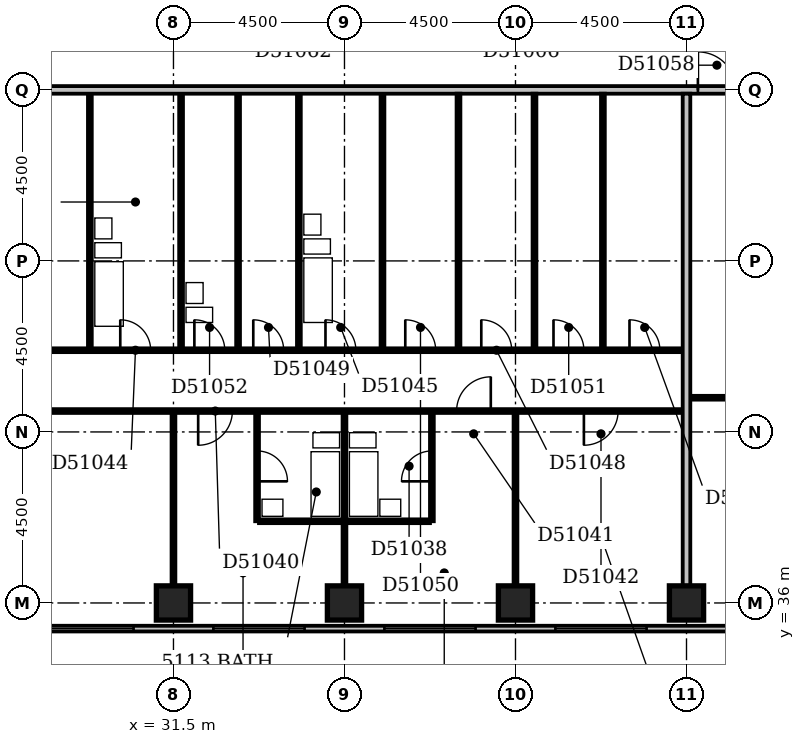
"""IFC4 building model, lengths in metres.
Left out: names, types, materials, properties, quantities, classifications, styles, units other than length and angle.
Written with IfcOpenShell. Run it as: python <this file> out.ifc"""

import sys

from ifc_helpers import new_model, si_unit, direction, frame, frame_2d, origin, origin_2d, place, context, subcontext, project, spatial, rectangle, extrude, element, fill, save


model = new_model("IFC4")
c1 = context("Model", 3, precision=1e-05, world=origin(), true_north=direction((0.0, 1.0)))
c2 = subcontext(c1, "Body", "Model", "MODEL_VIEW")
j1 = project(units=[si_unit("LENGTHUNIT", "METRE"), si_unit("PLANEANGLEUNIT", "RADIAN")], contexts=[c1])
p1 = place(None, origin())
s1 = spatial("IfcSite", under=j1, at=p1, CompositionType="ELEMENT")
p2 = place(p1, origin())
s2 = spatial("IfcBuilding", under=s1, at=p2, CompositionType="ELEMENT")
p3 = place(p2, frame((0.0, 0.0, 200.6)))
s3 = spatial("IfcBuildingStorey", under=s2, at=p3, CompositionType="ELEMENT", Elevation=200.6)
for number, where, z_axis, x_axis in (
    (1, (31.5, 36.0, -0.3), (0.0, 0.0, 1.0), (1.0, 0.0, 0.0)),
    (2, (36.0, 36.0, -0.3), (0.0, 0.0, 1.0), (1.0, 0.0, 0.0)),
    (3, (40.5, 36.0, -0.3), (0.0, 0.0, 1.0), (1.0, 0.0, 0.0)),
    (4, (45.0, 36.0, -0.3), (0.0, 0.0, 1.0), (1.0, 0.0, 0.0)),
):
    element("IfcColumn", number, at=place(p3, frame(where, z_axis=z_axis, x_axis=x_axis)), inside=s3, PredefinedType="COLUMN", context=c2, shape_type="SweptSolid", body=[
        extrude(rectangle(XDim=0.9, YDim=0.9, at=origin_2d()), origin(), (0.0, 0.0, 1.0), 3.6),
    ])
p4 = place(p3, frame((23.1, 35.325, 0.0), z_axis=(0.0, 0.0, 1.0), x_axis=(1.0, 0.0, 0.0)))
e5 = element("IfcWall", 5, at=p4, inside=s3, PredefinedType="STANDARD", context=c2, shape_type="SweptSolid", body=[
    extrude(rectangle(XDim=27.15, YDim=0.15, at=frame_2d((13.575, 0.0))), origin(), (0.0, 0.0, 1.0), 2.7),
])
p5 = place(p4, frame((0.45, 0.0, 0.6)))
e6 = element("IfcOpeningElement", 6, at=p5, cuts=e5, PredefinedType="OPENING", context=c2, shape_type="SweptSolid", body=[
    extrude(rectangle(XDim=2.4, YDim=1.8, at=frame_2d((1.2, 0.9))), frame((0.0, 0.087, 0.0), z_axis=(0.0, -1.0, 0.0), x_axis=(1.0, 0.0, 0.0)), (0.0, 0.0, 1.0), 0.174),
])
p6 = place(p4, frame((4.95, 0.0, 0.6)))
e7 = element("IfcOpeningElement", 7, at=p6, cuts=e5, PredefinedType="OPENING", context=c2, shape_type="SweptSolid", body=[
    extrude(rectangle(XDim=2.4, YDim=1.8, at=frame_2d((1.2, 0.9))), frame((0.0, 0.087, 0.0), z_axis=(0.0, -1.0, 0.0), x_axis=(1.0, 0.0, 0.0)), (0.0, 0.0, 1.0), 0.174),
])
p7 = place(p4, frame((9.45, 0.0, 0.6)))
e8 = element("IfcOpeningElement", 8, at=p7, cuts=e5, PredefinedType="OPENING", context=c2, shape_type="SweptSolid", body=[
    extrude(rectangle(XDim=2.4, YDim=1.8, at=frame_2d((1.2, 0.9))), frame((0.0, 0.087, 0.0), z_axis=(0.0, -1.0, 0.0), x_axis=(1.0, 0.0, 0.0)), (0.0, 0.0, 1.0), 0.174),
])
p8 = place(p4, frame((13.95, 0.0, 0.6)))
e9 = element("IfcOpeningElement", 9, at=p8, cuts=e5, PredefinedType="OPENING", context=c2, shape_type="SweptSolid", body=[
    extrude(rectangle(XDim=2.4, YDim=1.8, at=frame_2d((1.2, 0.9))), frame((0.0, 0.087, 0.0), z_axis=(0.0, -1.0, 0.0), x_axis=(1.0, 0.0, 0.0)), (0.0, 0.0, 1.0), 0.174),
])
p9 = place(p4, frame((18.45, 0.0, 0.6)))
e10 = element("IfcOpeningElement", 10, at=p9, cuts=e5, PredefinedType="OPENING", context=c2, shape_type="SweptSolid", body=[
    extrude(rectangle(XDim=2.4, YDim=1.8, at=frame_2d((1.2, 0.9))), frame((0.0, 0.087, 0.0), z_axis=(0.0, -1.0, 0.0), x_axis=(1.0, 0.0, 0.0)), (0.0, 0.0, 1.0), 0.174),
])
p10 = place(p4, frame((22.95, 0.0, 0.6)))
e11 = element("IfcOpeningElement", 11, at=p10, cuts=e5, PredefinedType="OPENING", context=c2, shape_type="SweptSolid", body=[
    extrude(rectangle(XDim=2.4, YDim=1.8, at=frame_2d((1.2, 0.9))), frame((0.0, 0.087, 0.0), z_axis=(0.0, -1.0, 0.0), x_axis=(1.0, 0.0, 0.0)), (0.0, 0.0, 1.0), 0.174),
])
p11 = place(p3, frame((31.5, 36.45, 0.0), z_axis=(0.0, 0.0, 1.0), x_axis=(0.0, 1.0, 0.0)))
e12 = element("IfcWall", 12, at=p11, inside=s3, PredefinedType="PARTITIONING", context=c2, shape_type="SweptSolid", body=[
    extrude(rectangle(XDim=4.55, YDim=0.1, at=frame_2d((2.275, 0.0))), origin(), (0.0, 0.0, 1.0), 3.3),
])
p12 = place(p3, frame((36.0, 36.45, 0.0), z_axis=(0.0, 0.0, 1.0), x_axis=(0.0, 1.0, 0.0)))
e13 = element("IfcWall", 13, at=p12, inside=s3, PredefinedType="PARTITIONING", context=c2, shape_type="SweptSolid", body=[
    extrude(rectangle(XDim=4.55, YDim=0.1, at=frame_2d((2.275, 0.0))), origin(), (0.0, 0.0, 1.0), 2.4),
])
p13 = place(p3, frame((40.5, 36.45, 0.0), z_axis=(0.0, 0.0, 1.0), x_axis=(0.0, 1.0, 0.0)))
e14 = element("IfcWall", 14, at=p13, inside=s3, PredefinedType="PARTITIONING", context=c2, shape_type="SweptSolid", body=[
    extrude(rectangle(XDim=4.55, YDim=0.1, at=frame_2d((2.275, 0.0))), origin(), (0.0, 0.0, 1.0), 3.3),
])
p14 = place(p3, frame((45.0, 36.45, 0.0), z_axis=(0.0, 0.0, 1.0), x_axis=(0.0, 1.0, 0.0)))
e15 = element("IfcWall", 15, at=p14, inside=s3, PredefinedType="PARTITIONING", context=c2, shape_type="SweptSolid", body=[
    extrude(rectangle(XDim=12.95, YDim=0.2, at=frame_2d((6.475, 0.0))), origin(), (0.0, 0.0, 1.0), 2.6),
])
p15 = place(p3, frame((33.7, 38.15, 0.0), z_axis=(0.0, 0.0, 1.0), x_axis=(0.0, 1.0, 0.0)))
e16 = element("IfcWall", 16, at=p15, inside=s3, PredefinedType="PLUMBINGWALL", context=c2, shape_type="SweptSolid", body=[
    extrude(rectangle(XDim=2.85, YDim=0.1, at=frame_2d((1.425, 0.0))), origin(), (0.0, 0.0, 1.0), 3.3),
])
p16 = place(p15, frame((1.05, 0.0, 0.0)))
e17 = element("IfcOpeningElement", 17, at=p16, cuts=e16, PredefinedType="OPENING", context=c2, shape_type="SweptSolid", body=[
    extrude(rectangle(XDim=0.8, YDim=2.1, at=frame_2d((0.4, 1.05))), frame((0.0, 0.062, 0.0), z_axis=(0.0, -1.0, 0.0), x_axis=(1.0, 0.0, 0.0)), (0.0, 0.0, 1.0), 0.124),
])
p17 = place(p3, frame((33.75, 38.15, 0.0), z_axis=(0.0, 0.0, 1.0), x_axis=(1.0, 0.0, 0.0)))
e18 = element("IfcWall", 18, at=p17, inside=s3, PredefinedType="PLUMBINGWALL", context=c2, shape_type="SweptSolid", body=[
    extrude(rectangle(XDim=4.5, YDim=0.1, at=frame_2d((2.25, 0.0))), origin(), (0.0, 0.0, 1.0), 3.3),
])
p18 = place(p3, frame((38.3, 38.15, 0.0), z_axis=(0.0, 0.0, 1.0), x_axis=(0.0, 1.0, 0.0)))
e19 = element("IfcWall", 19, at=p18, inside=s3, PredefinedType="PLUMBINGWALL", context=c2, shape_type="SweptSolid", body=[
    extrude(rectangle(XDim=2.85, YDim=0.1, at=frame_2d((1.425, 0.0))), origin(), (0.0, 0.0, 1.0), 3.3),
])
p19 = place(p18, frame((1.05, 0.0, 0.0)))
e20 = element("IfcOpeningElement", 20, at=p19, cuts=e19, PredefinedType="OPENING", context=c2, shape_type="SweptSolid", body=[
    extrude(rectangle(XDim=0.8, YDim=2.1, at=frame_2d((0.4, 1.05))), frame((0.0, 0.062, 0.0), z_axis=(0.0, -1.0, 0.0), x_axis=(1.0, 0.0, 0.0)), (0.0, 0.0, 1.0), 0.124),
])
p20 = place(p3, frame((22.6, 41.05, 0.0), z_axis=(0.0, 0.0, 1.0), x_axis=(1.0, 0.0, 0.0)))
e21 = element("IfcWall", 21, at=p20, inside=s3, PredefinedType="PARTITIONING", context=c2, shape_type="SweptSolid", body=[
    extrude(rectangle(XDim=22.3, YDim=0.1, at=frame_2d((11.15, 0.0))), origin(), (0.0, 0.0, 1.0), 3.3),
])
p21 = place(p20, frame((3.9, 0.0, 0.0)))
e22 = element("IfcOpeningElement", 22, at=p21, cuts=e21, PredefinedType="OPENING", context=c2, shape_type="SweptSolid", body=[
    extrude(rectangle(XDim=0.9, YDim=2.1, at=frame_2d((0.45, 1.05))), frame((0.0, 0.062, 0.0), z_axis=(0.0, -1.0, 0.0), x_axis=(1.0, 0.0, 0.0)), (0.0, 0.0, 1.0), 0.124),
])
p22 = place(p20, frame((9.55, 0.0, 0.0)))
e23 = element("IfcOpeningElement", 23, at=p22, cuts=e21, PredefinedType="OPENING", context=c2, shape_type="SweptSolid", body=[
    extrude(rectangle(XDim=0.9, YDim=2.1, at=frame_2d((0.45, 1.05))), frame((0.0, 0.062, 0.0), z_axis=(0.0, -1.0, 0.0), x_axis=(1.0, 0.0, 0.0)), (0.0, 0.0, 1.0), 0.124),
])
p23 = place(p20, frame((16.35, 0.0, 0.0)))
e24 = element("IfcOpeningElement", 24, at=p23, cuts=e21, PredefinedType="OPENING", context=c2, shape_type="SweptSolid", body=[
    extrude(rectangle(XDim=0.9, YDim=2.1, at=frame_2d((0.45, 1.05))), frame((0.0, 0.062, 0.0), z_axis=(0.0, -1.0, 0.0), x_axis=(1.0, 0.0, 0.0)), (0.0, 0.0, 1.0), 0.124),
])
p24 = place(p20, frame((19.7, 0.0, 0.0)))
e25 = element("IfcOpeningElement", 25, at=p24, cuts=e21, PredefinedType="OPENING", context=c2, shape_type="SweptSolid", body=[
    extrude(rectangle(XDim=0.9, YDim=2.1, at=frame_2d((0.45, 1.05))), frame((0.0, 0.062, 0.0), z_axis=(0.0, -1.0, 0.0), x_axis=(1.0, 0.0, 0.0)), (0.0, 0.0, 1.0), 0.124),
])
p25 = place(p3, frame((45.1, 41.4, 0.0), z_axis=(0.0, 0.0, 1.0), x_axis=(1.0, 0.0, 0.0)))
e26 = element("IfcWall", 26, at=p25, inside=s3, PredefinedType="PARTITIONING", context=c2, shape_type="SweptSolid", body=[
    extrude(rectangle(XDim=9.5, YDim=0.1, at=frame_2d((4.75, 0.0))), origin(), (0.0, 0.0, 1.0), 3.3),
])
p26 = place(p25, frame((3.95, 0.0, 0.0)))
e27 = element("IfcOpeningElement", 27, at=p26, cuts=e26, PredefinedType="OPENING", context=c2, shape_type="SweptSolid", body=[
    extrude(rectangle(XDim=0.9, YDim=2.1, at=frame_2d((0.45, 1.05))), frame((0.0, 0.062, 0.0), z_axis=(0.0, -1.0, 0.0), x_axis=(1.0, 0.0, 0.0)), (0.0, 0.0, 1.0), 0.124),
])
p27 = place(p3, frame((24.15, 42.65, 0.0), z_axis=(0.0, 0.0, 1.0), x_axis=(1.0, 0.0, 0.0)))
e28 = element("IfcWall", 28, at=p27, inside=s3, PredefinedType="PARTITIONING", context=c2, shape_type="SweptSolid", body=[
    extrude(rectangle(XDim=20.75, YDim=0.1, at=frame_2d((10.375, 0.0))), origin(), (0.0, 0.0, 1.0), 3.3),
])
p28 = place(p27, frame((5.95, 0.0, 0.0)))
e29 = element("IfcOpeningElement", 29, at=p28, cuts=e28, PredefinedType="OPENING", context=c2, shape_type="SweptSolid", body=[
    extrude(rectangle(XDim=0.8, YDim=2.1, at=frame_2d((0.4, 1.05))), frame((0.0, 0.062, 0.0), z_axis=(0.0, -1.0, 0.0), x_axis=(1.0, 0.0, 0.0)), (0.0, 0.0, 1.0), 0.124),
])
p29 = place(p27, frame((11.35, 0.0, 0.0)))
e30 = element("IfcOpeningElement", 30, at=p29, cuts=e28, PredefinedType="OPENING", context=c2, shape_type="SweptSolid", body=[
    extrude(rectangle(XDim=0.8, YDim=2.1, at=frame_2d((0.4, 1.05))), frame((0.0, 0.062, 0.0), z_axis=(0.0, -1.0, 0.0), x_axis=(1.0, 0.0, 0.0)), (0.0, 0.0, 1.0), 0.124),
])
p30 = place(p27, frame((2.1, 0.0, 0.0)))
e31 = element("IfcOpeningElement", 31, at=p30, cuts=e28, PredefinedType="OPENING", context=c2, shape_type="SweptSolid", body=[
    extrude(rectangle(XDim=0.9, YDim=2.1, at=frame_2d((0.45, 1.05))), frame((0.0, 0.062, 0.0), z_axis=(0.0, -1.0, 0.0), x_axis=(1.0, 0.0, 0.0)), (0.0, 0.0, 1.0), 0.124),
])
p31 = place(p27, frame((19.35, 0.0, 0.0)))
e32 = element("IfcOpeningElement", 32, at=p31, cuts=e28, PredefinedType="OPENING", context=c2, shape_type="SweptSolid", body=[
    extrude(rectangle(XDim=0.8, YDim=2.1, at=frame_2d((0.4, 1.05))), frame((0.0, 0.062, 0.0), z_axis=(0.0, -1.0, 0.0), x_axis=(1.0, 0.0, 0.0)), (0.0, 0.0, 1.0), 0.124),
])
p32 = place(p27, frame((15.45, 0.0, 0.0)))
e33 = element("IfcOpeningElement", 33, at=p32, cuts=e28, PredefinedType="OPENING", context=c2, shape_type="SweptSolid", body=[
    extrude(rectangle(XDim=0.8, YDim=2.1, at=frame_2d((0.4, 1.05))), frame((0.0, 0.062, 0.0), z_axis=(0.0, -1.0, 0.0), x_axis=(1.0, 0.0, 0.0)), (0.0, 0.0, 1.0), 0.124),
])
p33 = place(p27, frame((9.45, 0.0, 0.0)))
e34 = element("IfcOpeningElement", 34, at=p33, cuts=e28, PredefinedType="OPENING", context=c2, shape_type="SweptSolid", body=[
    extrude(rectangle(XDim=0.8, YDim=2.1, at=frame_2d((0.4, 1.05))), frame((0.0, 0.062, 0.0), z_axis=(0.0, -1.0, 0.0), x_axis=(1.0, 0.0, 0.0)), (0.0, 0.0, 1.0), 0.124),
])
p34 = place(p27, frame((13.45, 0.0, 0.0)))
e35 = element("IfcOpeningElement", 35, at=p34, cuts=e28, PredefinedType="OPENING", context=c2, shape_type="SweptSolid", body=[
    extrude(rectangle(XDim=0.8, YDim=2.1, at=frame_2d((0.4, 1.05))), frame((0.0, 0.062, 0.0), z_axis=(0.0, -1.0, 0.0), x_axis=(1.0, 0.0, 0.0)), (0.0, 0.0, 1.0), 0.124),
])
p35 = place(p27, frame((17.35, 0.0, 0.0)))
e36 = element("IfcOpeningElement", 36, at=p35, cuts=e28, PredefinedType="OPENING", context=c2, shape_type="SweptSolid", body=[
    extrude(rectangle(XDim=0.8, YDim=2.1, at=frame_2d((0.4, 1.05))), frame((0.0, 0.062, 0.0), z_axis=(0.0, -1.0, 0.0), x_axis=(1.0, 0.0, 0.0)), (0.0, 0.0, 1.0), 0.124),
])
p36 = place(p27, frame((7.9, 0.0, 0.0)))
e37 = element("IfcOpeningElement", 37, at=p36, cuts=e28, PredefinedType="OPENING", context=c2, shape_type="SweptSolid", body=[
    extrude(rectangle(XDim=0.8, YDim=2.1, at=frame_2d((0.4, 1.05))), frame((0.0, 0.062, 0.0), z_axis=(0.0, -1.0, 0.0), x_axis=(1.0, 0.0, 0.0)), (0.0, 0.0, 1.0), 0.124),
])
for number, where, z_axis, x_axis in (
    (38, (29.3, 42.7, 0.0), (0.0, 0.0, 1.0), (0.0, 1.0, 0.0)),
    (39, (31.7, 42.7, 0.0), (0.0, 0.0, 1.0), (0.0, 1.0, 0.0)),
    (40, (33.2, 42.7, 0.0), (0.0, 0.0, 1.0), (0.0, 1.0, 0.0)),
    (41, (34.8, 42.7, 0.0), (0.0, 0.0, 1.0), (0.0, 1.0, 0.0)),
    (42, (37.0, 42.7, 0.0), (0.0, 0.0, 1.0), (0.0, 1.0, 0.0)),
):
    element("IfcWall", number, at=place(p3, frame(where, z_axis=z_axis, x_axis=x_axis)), inside=s3, PredefinedType="PLUMBINGWALL", context=c2, shape_type="SweptSolid", body=[
        extrude(rectangle(XDim=6.7, YDim=0.1, at=frame_2d((3.35, 0.0))), origin(), (0.0, 0.0, 1.0), 3.3),
    ])
for number, where, z_axis, x_axis in (
    (43, (39.0, 42.7, 0.0), (0.0, 0.0, 1.0), (0.0, 1.0, 0.0)),
    (44, (41.0, 42.7, 0.0), (0.0, 0.0, 1.0), (0.0, 1.0, 0.0)),
    (45, (42.8, 42.7, 0.0), (0.0, 0.0, 1.0), (0.0, 1.0, 0.0)),
):
    element("IfcWall", number, at=place(p3, frame(where, z_axis=z_axis, x_axis=x_axis)), inside=s3, PredefinedType="PARTITIONING", context=c2, shape_type="SweptSolid", body=[
        extrude(rectangle(XDim=6.7, YDim=0.1, at=frame_2d((3.35, 0.0))), origin(), (0.0, 0.0, 1.0), 3.3),
    ])
p37 = place(p3, frame((22.6, 49.5, 0.0), z_axis=(0.0, 0.0, 1.0), x_axis=(1.0, 0.0, 0.0)))
e46 = element("IfcWall", 46, at=p37, inside=s3, PredefinedType="PARTITIONING", context=c2, shape_type="SweptSolid", body=[
    extrude(rectangle(XDim=30.95, YDim=0.2, at=frame_2d((15.475, 0.0))), origin(), (0.0, 0.0, 1.0), 3.3),
])
p38 = place(p37, frame((0.2, 0.0, 0.0)))
e47 = element("IfcOpeningElement", 47, at=p38, cuts=e46, PredefinedType="OPENING", context=c2, shape_type="SweptSolid", body=[
    extrude(rectangle(XDim=1.0, YDim=2.1, at=frame_2d((0.5, 1.05))), frame((0.0, 0.112, 0.0), z_axis=(0.0, -1.0, 0.0), x_axis=(1.0, 0.0, 0.0)), (0.0, 0.0, 1.0), 0.224),
])
p39 = place(p37, frame((22.7, 0.0, 0.0)))
e48 = element("IfcOpeningElement", 48, at=p39, cuts=e46, PredefinedType="OPENING", context=c2, shape_type="SweptSolid", body=[
    extrude(rectangle(XDim=1.0, YDim=2.1, at=frame_2d((0.5, 1.05))), frame((0.0, 0.112, 0.0), z_axis=(0.0, -1.0, 0.0), x_axis=(1.0, 0.0, 0.0)), (0.0, 0.0, 1.0), 0.224),
])
p40 = place(p6, origin())
e49 = element("IfcWindow", 49, at=p40, inside=s3, PartitioningType="SINGLE_PANEL", PredefinedType="WINDOW", context=c2, shape_type="SweptSolid", body=[
    extrude(rectangle(XDim=2.4, YDim=1.8, at=frame_2d((1.2, 0.9))), frame((0.0, 0.03, 0.0), z_axis=(0.0, -1.0, 0.0), x_axis=(1.0, 0.0, 0.0)), (0.0, 0.0, 1.0), 0.06),
])
fill(e7, e49)
p41 = place(p7, origin())
e50 = element("IfcWindow", 50, at=p41, inside=s3, PartitioningType="SINGLE_PANEL", PredefinedType="WINDOW", context=c2, shape_type="SweptSolid", body=[
    extrude(rectangle(XDim=2.4, YDim=1.8, at=frame_2d((1.2, 0.9))), frame((0.0, 0.03, 0.0), z_axis=(0.0, -1.0, 0.0), x_axis=(1.0, 0.0, 0.0)), (0.0, 0.0, 1.0), 0.06),
])
fill(e8, e50)
p42 = place(p8, origin())
e51 = element("IfcWindow", 51, at=p42, inside=s3, PartitioningType="SINGLE_PANEL", PredefinedType="WINDOW", context=c2, shape_type="SweptSolid", body=[
    extrude(rectangle(XDim=2.4, YDim=1.8, at=frame_2d((1.2, 0.9))), frame((0.0, 0.03, 0.0), z_axis=(0.0, -1.0, 0.0), x_axis=(1.0, 0.0, 0.0)), (0.0, 0.0, 1.0), 0.06),
])
fill(e9, e51)
p43 = place(p9, origin())
e52 = element("IfcWindow", 52, at=p43, inside=s3, PartitioningType="SINGLE_PANEL", PredefinedType="WINDOW", context=c2, shape_type="SweptSolid", body=[
    extrude(rectangle(XDim=2.4, YDim=1.8, at=frame_2d((1.2, 0.9))), frame((0.0, 0.03, 0.0), z_axis=(0.0, -1.0, 0.0), x_axis=(1.0, 0.0, 0.0)), (0.0, 0.0, 1.0), 0.06),
])
fill(e10, e52)
p44 = place(p16, frame((0.8, 0.0, 0.0), z_axis=(0.0, 0.0, 1.0), x_axis=(-1.0, 0.0, 0.0)))
e53 = element("IfcDoor", 53, at=p44, inside=s3, OperationType="SINGLE_SWING_RIGHT", PredefinedType="DOOR", context=c2, shape_type="SweptSolid", body=[
    extrude(rectangle(XDim=0.8, YDim=2.1, at=frame_2d((0.4, 1.05))), frame((0.0, 0.025, 0.0), z_axis=(0.0, -1.0, 0.0), x_axis=(1.0, 0.0, 0.0)), (0.0, 0.0, 1.0), 0.05),
])
fill(e17, e53)
p45 = place(p19, origin())
e54 = element("IfcDoor", 54, at=p45, inside=s3, OperationType="SINGLE_SWING_LEFT", PredefinedType="DOOR", context=c2, shape_type="SweptSolid", body=[
    extrude(rectangle(XDim=0.8, YDim=2.1, at=frame_2d((0.4, 1.05))), frame((0.0, 0.025, 0.0), z_axis=(0.0, -1.0, 0.0), x_axis=(1.0, 0.0, 0.0)), (0.0, 0.0, 1.0), 0.05),
])
fill(e20, e54)
p46 = place(p22, frame((0.9, 0.0, 0.0), z_axis=(0.0, 0.0, 1.0), x_axis=(-1.0, 0.0, 0.0)))
e55 = element("IfcDoor", 55, at=p46, inside=s3, OperationType="SINGLE_SWING_RIGHT", PredefinedType="DOOR", context=c2, shape_type="SweptSolid", body=[
    extrude(rectangle(XDim=0.9, YDim=2.1, at=frame_2d((0.45, 1.05))), frame((0.0, 0.025, 0.0), z_axis=(0.0, -1.0, 0.0), x_axis=(1.0, 0.0, 0.0)), (0.0, 0.0, 1.0), 0.05),
])
fill(e23, e55)
p47 = place(p23, frame((0.9, 0.0, 0.0), z_axis=(0.0, 0.0, 1.0), x_axis=(-1.0, 0.0, 0.0)))
e56 = element("IfcDoor", 56, at=p47, inside=s3, OperationType="SINGLE_SWING_LEFT", PredefinedType="DOOR", context=c2, shape_type="SweptSolid", body=[
    extrude(rectangle(XDim=0.9, YDim=2.1, at=frame_2d((0.45, 1.05))), frame((0.0, 0.025, 0.0), z_axis=(0.0, -1.0, 0.0), x_axis=(1.0, 0.0, 0.0)), (0.0, 0.0, 1.0), 0.05),
])
fill(e24, e56)
p48 = place(p24, frame((0.9, 0.0, 0.0), z_axis=(0.0, 0.0, 1.0), x_axis=(-1.0, 0.0, 0.0)))
e57 = element("IfcDoor", 57, at=p48, inside=s3, OperationType="SINGLE_SWING_RIGHT", PredefinedType="DOOR", context=c2, shape_type="SweptSolid", body=[
    extrude(rectangle(XDim=0.9, YDim=2.1, at=frame_2d((0.45, 1.05))), frame((0.0, 0.025, 0.0), z_axis=(0.0, -1.0, 0.0), x_axis=(1.0, 0.0, 0.0)), (0.0, 0.0, 1.0), 0.05),
])
fill(e25, e57)
p49 = place(p28, origin())
e58 = element("IfcDoor", 58, at=p49, inside=s3, OperationType="SINGLE_SWING_LEFT", PredefinedType="DOOR", context=c2, shape_type="SweptSolid", body=[
    extrude(rectangle(XDim=0.8, YDim=2.1, at=frame_2d((0.4, 1.05))), frame((0.0, 0.025, 0.0), z_axis=(0.0, -1.0, 0.0), x_axis=(1.0, 0.0, 0.0)), (0.0, 0.0, 1.0), 0.05),
])
fill(e29, e58)
p50 = place(p29, origin())
e59 = element("IfcDoor", 59, at=p50, inside=s3, OperationType="SINGLE_SWING_LEFT", PredefinedType="DOOR", context=c2, shape_type="SweptSolid", body=[
    extrude(rectangle(XDim=0.8, YDim=2.1, at=frame_2d((0.4, 1.05))), frame((0.0, 0.025, 0.0), z_axis=(0.0, -1.0, 0.0), x_axis=(1.0, 0.0, 0.0)), (0.0, 0.0, 1.0), 0.05),
])
fill(e30, e59)
p51 = place(p31, origin())
e60 = element("IfcDoor", 60, at=p51, inside=s3, OperationType="SINGLE_SWING_LEFT", PredefinedType="DOOR", context=c2, shape_type="SweptSolid", body=[
    extrude(rectangle(XDim=0.8, YDim=2.1, at=frame_2d((0.4, 1.05))), frame((0.0, 0.025, 0.0), z_axis=(0.0, -1.0, 0.0), x_axis=(1.0, 0.0, 0.0)), (0.0, 0.0, 1.0), 0.05),
])
fill(e32, e60)
p52 = place(p32, origin())
e61 = element("IfcDoor", 61, at=p52, inside=s3, OperationType="SINGLE_SWING_LEFT", PredefinedType="DOOR", context=c2, shape_type="SweptSolid", body=[
    extrude(rectangle(XDim=0.8, YDim=2.1, at=frame_2d((0.4, 1.05))), frame((0.0, 0.025, 0.0), z_axis=(0.0, -1.0, 0.0), x_axis=(1.0, 0.0, 0.0)), (0.0, 0.0, 1.0), 0.05),
])
fill(e33, e61)
p53 = place(p33, origin())
e62 = element("IfcDoor", 62, at=p53, inside=s3, OperationType="SINGLE_SWING_LEFT", PredefinedType="DOOR", context=c2, shape_type="SweptSolid", body=[
    extrude(rectangle(XDim=0.8, YDim=2.1, at=frame_2d((0.4, 1.05))), frame((0.0, 0.025, 0.0), z_axis=(0.0, -1.0, 0.0), x_axis=(1.0, 0.0, 0.0)), (0.0, 0.0, 1.0), 0.05),
])
fill(e34, e62)
p54 = place(p34, origin())
e63 = element("IfcDoor", 63, at=p54, inside=s3, OperationType="SINGLE_SWING_LEFT", PredefinedType="DOOR", context=c2, shape_type="SweptSolid", body=[
    extrude(rectangle(XDim=0.8, YDim=2.1, at=frame_2d((0.4, 1.05))), frame((0.0, 0.025, 0.0), z_axis=(0.0, -1.0, 0.0), x_axis=(1.0, 0.0, 0.0)), (0.0, 0.0, 1.0), 0.05),
])
fill(e35, e63)
p55 = place(p35, origin())
e64 = element("IfcDoor", 64, at=p55, inside=s3, OperationType="SINGLE_SWING_LEFT", PredefinedType="DOOR", context=c2, shape_type="SweptSolid", body=[
    extrude(rectangle(XDim=0.8, YDim=2.1, at=frame_2d((0.4, 1.05))), frame((0.0, 0.025, 0.0), z_axis=(0.0, -1.0, 0.0), x_axis=(1.0, 0.0, 0.0)), (0.0, 0.0, 1.0), 0.05),
])
fill(e36, e64)
p56 = place(p36, origin())
e65 = element("IfcDoor", 65, at=p56, inside=s3, OperationType="SINGLE_SWING_LEFT", PredefinedType="DOOR", context=c2, shape_type="SweptSolid", body=[
    extrude(rectangle(XDim=0.8, YDim=2.1, at=frame_2d((0.4, 1.05))), frame((0.0, 0.025, 0.0), z_axis=(0.0, -1.0, 0.0), x_axis=(1.0, 0.0, 0.0)), (0.0, 0.0, 1.0), 0.05),
])
fill(e37, e65)
p57 = place(p39, origin())
e66 = element("IfcDoor", 66, at=p57, inside=s3, OperationType="SINGLE_SWING_LEFT", PredefinedType="DOOR", context=c2, shape_type="SweptSolid", body=[
    extrude(rectangle(XDim=1.0, YDim=2.1, at=frame_2d((0.5, 1.05))), frame((0.0, 0.025, 0.0), z_axis=(0.0, -1.0, 0.0), x_axis=(1.0, 0.0, 0.0)), (0.0, 0.0, 1.0), 0.05),
])
fill(e48, e66)
save(model, sys.argv[1])
